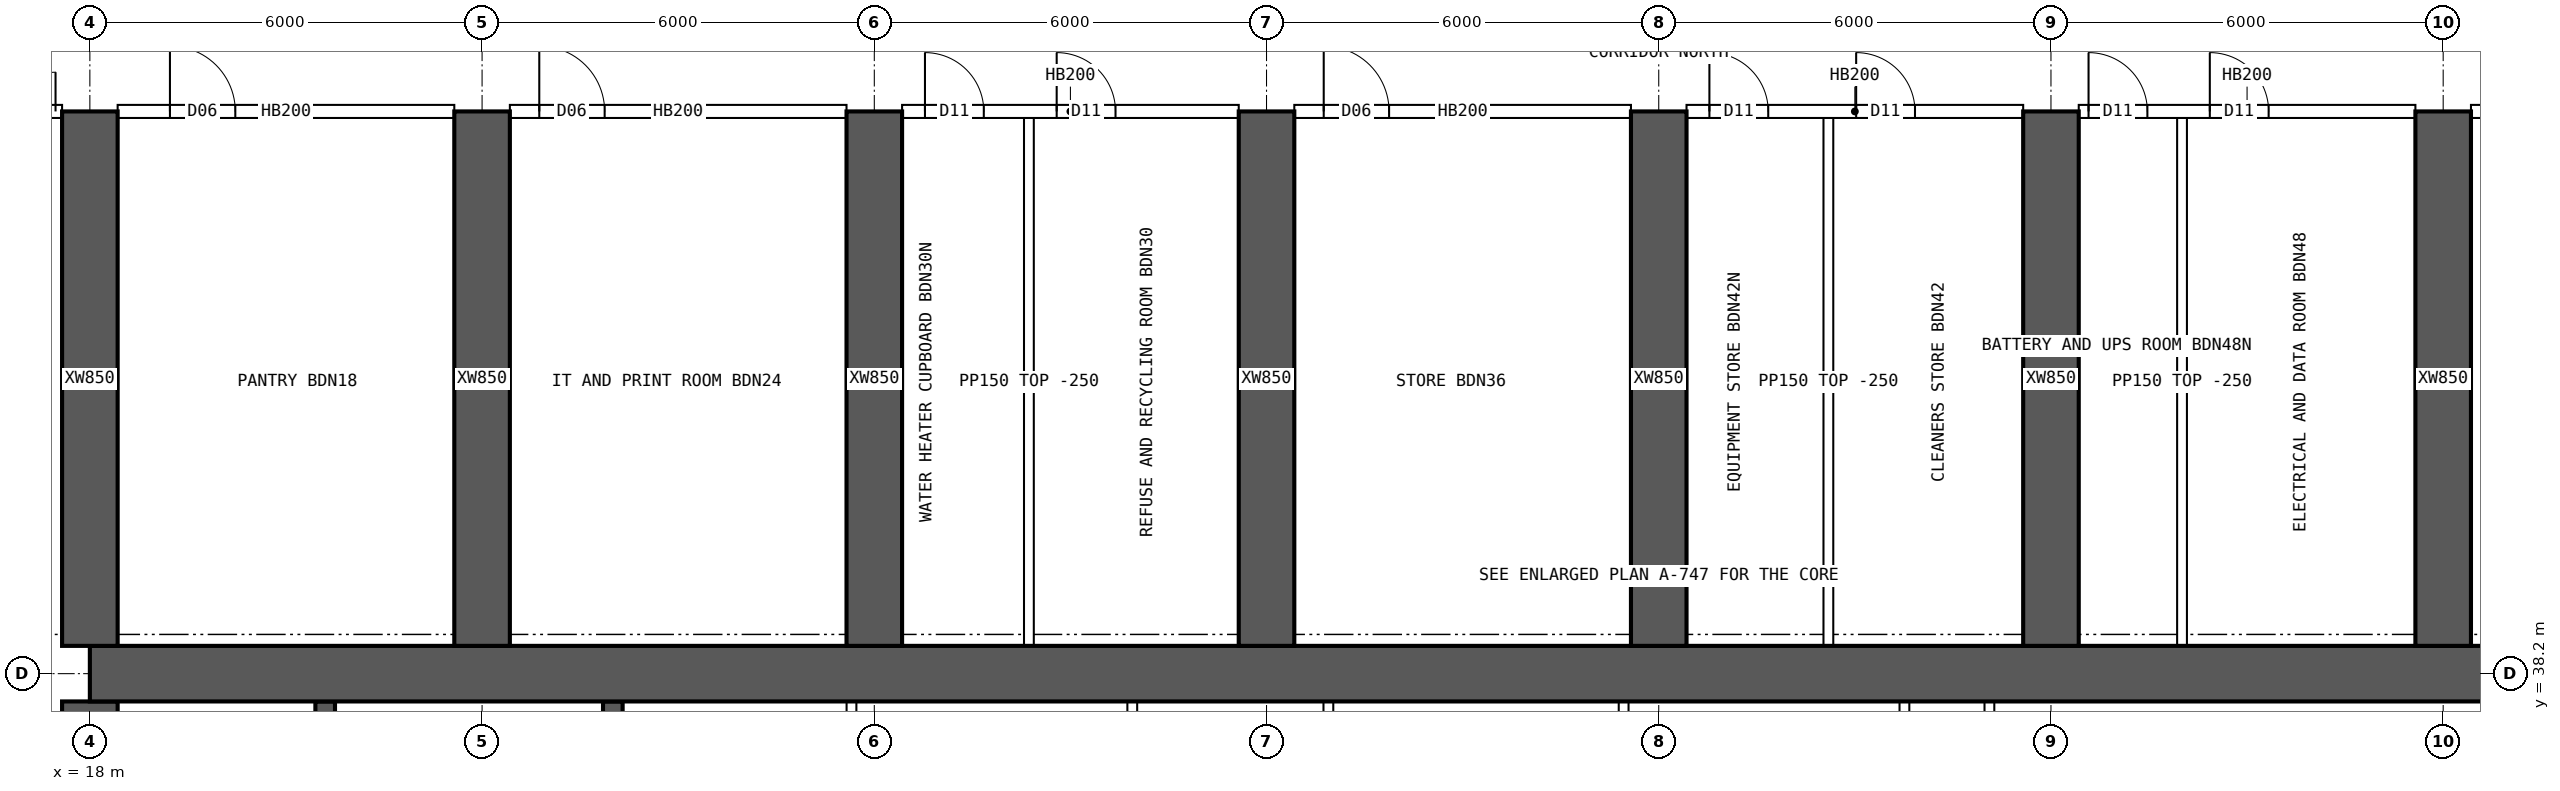
"""IFC4 building model, lengths in metres.
Left out: names, types, materials, properties, quantities, classifications, styles, units other than length and angle.
Written with IfcOpenShell. Run it as: python <this file> out.ifc"""

import sys

from ifc_helpers import new_model, si_unit, direction, frame, frame_2d, origin, place, context, subcontext, project, spatial, rectangle, extrude, element, fill, save


model = new_model("IFC4")
c1 = context("Model", 3, precision=1e-05, world=origin(), true_north=direction((0.0, 1.0)))
c2 = subcontext(c1, "Body", "Model", "MODEL_VIEW")
j1 = project(units=[si_unit("LENGTHUNIT", "METRE"), si_unit("PLANEANGLEUNIT", "RADIAN")], contexts=[c1])
p1 = place(None, origin())
s1 = spatial("IfcSite", under=j1, at=p1, CompositionType="ELEMENT")
p2 = place(p1, origin())
s2 = spatial("IfcBuilding", under=s1, at=p2, CompositionType="ELEMENT")
p3 = place(p2, frame((0.0, 0.0, 178.6)))
s3 = spatial("IfcBuildingStorey", under=s2, at=p3, CompositionType="ELEMENT", Elevation=178.6)
p4 = place(p3, frame((18.0, 38.2, 0.0), z_axis=(0.0, 0.0, 1.0), x_axis=(1.0, 0.0, 0.0)))
e1 = element("IfcWall", 1, at=p4, inside=s3, PredefinedType="SHEAR", context=c2, shape_type="SweptSolid", body=[
    extrude(rectangle(XDim=48.0, YDim=0.85, at=frame_2d((24.0, 0.0))), origin(), (0.0, 0.0, 1.0), 3.75),
])
p5 = place(p3, frame((18.0, 26.225, 0.0), z_axis=(0.0, 0.0, 1.0), x_axis=(0.0, 1.0, 0.0)))
e2 = element("IfcWall", 2, at=p5, inside=s3, PredefinedType="SHEAR", context=c2, shape_type="SweptSolid", body=[
    extrude(rectangle(XDim=11.55, YDim=0.85, at=frame_2d((5.775, 0.0))), origin(), (0.0, 0.0, 1.0), 3.75),
])
p6 = place(p5, frame((5.075, 0.0, 0.0)))
e3 = element("IfcOpeningElement", 3, at=p6, cuts=e2, PredefinedType="OPENING", context=c2, shape_type="SweptSolid", body=[
    extrude(rectangle(XDim=1.2, YDim=2.1, at=frame_2d((0.6, 1.05))), frame((0.0, 0.435, 0.0), z_axis=(0.0, -1.0, 0.0), x_axis=(1.0, 0.0, 0.0)), (0.0, 0.0, 1.0), 0.87),
])
for number, where, z_axis, x_axis in (
    (4, (21.6, 34.75, 0.0), (0.0, 0.0, 1.0), (0.0, 1.0, 0.0)),
    (5, (26.0, 34.75, 0.0), (0.0, 0.0, 1.0), (0.0, 1.0, 0.0)),
):
    element("IfcWall", number, at=place(p3, frame(where, z_axis=z_axis, x_axis=x_axis)), inside=s3, PredefinedType="SHEAR", context=c2, shape_type="SweptSolid", body=[
        extrude(rectangle(XDim=3.025, YDim=0.3, at=frame_2d((1.512, 0.0))), origin(), (0.0, 0.0, 1.0), 3.75),
    ])
for number, where, z_axis, x_axis in (
    (6, (18.0, 38.625, 0.0), (0.0, 0.0, 1.0), (0.0, 1.0, 0.0)),
    (7, (24.0, 38.625, 0.0), (0.0, 0.0, 1.0), (0.0, 1.0, 0.0)),
    (8, (30.0, 38.625, 0.0), (0.0, 0.0, 1.0), (0.0, 1.0, 0.0)),
    (9, (36.0, 38.625, 0.0), (0.0, 0.0, 1.0), (0.0, 1.0, 0.0)),
    (10, (42.0, 38.625, 0.0), (0.0, 0.0, 1.0), (0.0, 1.0, 0.0)),
    (11, (48.0, 38.625, 0.0), (0.0, 0.0, 1.0), (0.0, 1.0, 0.0)),
    (12, (54.0, 38.625, 0.0), (0.0, 0.0, 1.0), (0.0, 1.0, 0.0)),
):
    element("IfcWall", number, at=place(p3, frame(where, z_axis=z_axis, x_axis=x_axis)), inside=s3, PredefinedType="SHEAR", context=c2, shape_type="SweptSolid", body=[
        extrude(rectangle(XDim=8.175, YDim=0.85, at=frame_2d((4.087, 0.0))), origin(), (0.0, 0.0, 1.0), 3.75),
    ])
for number, where, z_axis, x_axis in (
    (13, (29.651, 34.75, 0.0), (0.0, 0.0, 1.0), (0.0, 1.0, 0.0)),
    (14, (33.946, 34.75, 0.0), (0.0, 0.0, 1.0), (0.0, 1.0, 0.0)),
    (15, (36.946, 34.75, 0.0), (0.0, 0.0, 1.0), (0.0, 1.0, 0.0)),
    (16, (41.463, 34.75, 0.0), (0.0, 0.0, 1.0), (0.0, 1.0, 0.0)),
    (17, (45.758, 34.75, 0.0), (0.0, 0.0, 1.0), (0.0, 1.0, 0.0)),
    (18, (47.058, 34.75, 0.0), (0.0, 0.0, 1.0), (0.0, 1.0, 0.0)),
):
    element("IfcWall", number, at=place(p3, frame(where, z_axis=z_axis, x_axis=x_axis)), inside=s3, PredefinedType="SOLIDWALL", context=c2, shape_type="SweptSolid", body=[
        extrude(rectangle(XDim=3.025, YDim=0.15, at=frame_2d((1.512, 0.0))), origin(), (0.0, 0.0, 1.0), 3.5),
    ])
p7 = place(p3, frame((15.6, 46.8, 0.0), z_axis=(0.0, 0.0, 1.0), x_axis=(1.0, 0.0, 0.0)))
e19 = element("IfcWall", 19, at=p7, inside=s3, PredefinedType="SOLIDWALL", context=c2, shape_type="SweptSolid", body=[
    extrude(rectangle(XDim=1.975, YDim=0.2, at=frame_2d((0.987, 0.0))), origin(), (0.0, 0.0, 1.0), 3.5),
])
p8 = place(p7, frame((0.675, 0.0, 0.0)))
e20 = element("IfcOpeningElement", 20, at=p8, cuts=e19, PredefinedType="OPENING", context=c2, shape_type="SweptSolid", body=[
    extrude(rectangle(XDim=1.2, YDim=2.1, at=frame_2d((0.6, 1.05))), frame((0.0, 0.11, 0.0), z_axis=(0.0, -1.0, 0.0), x_axis=(1.0, 0.0, 0.0)), (0.0, 0.0, 1.0), 0.22),
])
p9 = place(p3, frame((18.425, 46.8, 0.0), z_axis=(0.0, 0.0, 1.0), x_axis=(1.0, 0.0, 0.0)))
e21 = element("IfcWall", 21, at=p9, inside=s3, PredefinedType="SOLIDWALL", context=c2, shape_type="SweptSolid", body=[
    extrude(rectangle(XDim=5.15, YDim=0.2, at=frame_2d((2.575, 0.0))), origin(), (0.0, 0.0, 1.0), 3.5),
])
p10 = place(p9, frame((0.8, 0.0, 0.0)))
e22 = element("IfcOpeningElement", 22, at=p10, cuts=e21, PredefinedType="OPENING", context=c2, shape_type="SweptSolid", body=[
    extrude(rectangle(XDim=1.0, YDim=2.1, at=frame_2d((0.5, 1.05))), frame((0.0, 0.11, 0.0), z_axis=(0.0, -1.0, 0.0), x_axis=(1.0, 0.0, 0.0)), (0.0, 0.0, 1.0), 0.22),
])
p11 = place(p3, frame((24.425, 46.8, 0.0), z_axis=(0.0, 0.0, 1.0), x_axis=(1.0, 0.0, 0.0)))
e23 = element("IfcWall", 23, at=p11, inside=s3, PredefinedType="SOLIDWALL", context=c2, shape_type="SweptSolid", body=[
    extrude(rectangle(XDim=5.15, YDim=0.2, at=frame_2d((2.575, 0.0))), origin(), (0.0, 0.0, 1.0), 3.5),
])
p12 = place(p11, frame((0.45, 0.0, 0.0)))
e24 = element("IfcOpeningElement", 24, at=p12, cuts=e23, PredefinedType="OPENING", context=c2, shape_type="SweptSolid", body=[
    extrude(rectangle(XDim=1.0, YDim=2.1, at=frame_2d((0.5, 1.05))), frame((0.0, 0.11, 0.0), z_axis=(0.0, -1.0, 0.0), x_axis=(1.0, 0.0, 0.0)), (0.0, 0.0, 1.0), 0.22),
])
p13 = place(p3, frame((30.425, 46.8, 0.0), z_axis=(0.0, 0.0, 1.0), x_axis=(1.0, 0.0, 0.0)))
e25 = element("IfcWall", 25, at=p13, inside=s3, PredefinedType="SOLIDWALL", context=c2, shape_type="SweptSolid", body=[
    extrude(rectangle(XDim=5.15, YDim=0.2, at=frame_2d((2.575, 0.0))), origin(), (0.0, 0.0, 1.0), 3.5),
])
p14 = place(p13, frame((0.35, 0.0, 0.0)))
e26 = element("IfcOpeningElement", 26, at=p14, cuts=e25, PredefinedType="OPENING", context=c2, shape_type="SweptSolid", body=[
    extrude(rectangle(XDim=0.9, YDim=2.1, at=frame_2d((0.45, 1.05))), frame((0.0, 0.11, 0.0), z_axis=(0.0, -1.0, 0.0), x_axis=(1.0, 0.0, 0.0)), (0.0, 0.0, 1.0), 0.22),
])
p15 = place(p13, frame((2.365, 0.0, 0.0)))
e27 = element("IfcOpeningElement", 27, at=p15, cuts=e25, PredefinedType="OPENING", context=c2, shape_type="SweptSolid", body=[
    extrude(rectangle(XDim=0.9, YDim=2.1, at=frame_2d((0.45, 1.05))), frame((0.0, 0.11, 0.0), z_axis=(0.0, -1.0, 0.0), x_axis=(1.0, 0.0, 0.0)), (0.0, 0.0, 1.0), 0.22),
])
p16 = place(p3, frame((36.425, 46.8, 0.0), z_axis=(0.0, 0.0, 1.0), x_axis=(1.0, 0.0, 0.0)))
e28 = element("IfcWall", 28, at=p16, inside=s3, PredefinedType="SOLIDWALL", context=c2, shape_type="SweptSolid", body=[
    extrude(rectangle(XDim=5.15, YDim=0.2, at=frame_2d((2.575, 0.0))), origin(), (0.0, 0.0, 1.0), 3.5),
])
p17 = place(p16, frame((0.45, 0.0, 0.0)))
e29 = element("IfcOpeningElement", 29, at=p17, cuts=e28, PredefinedType="OPENING", context=c2, shape_type="SweptSolid", body=[
    extrude(rectangle(XDim=1.0, YDim=2.1, at=frame_2d((0.5, 1.05))), frame((0.0, 0.11, 0.0), z_axis=(0.0, -1.0, 0.0), x_axis=(1.0, 0.0, 0.0)), (0.0, 0.0, 1.0), 0.22),
])
p18 = place(p3, frame((42.425, 46.8, 0.0), z_axis=(0.0, 0.0, 1.0), x_axis=(1.0, 0.0, 0.0)))
e30 = element("IfcWall", 30, at=p18, inside=s3, PredefinedType="SOLIDWALL", context=c2, shape_type="SweptSolid", body=[
    extrude(rectangle(XDim=5.15, YDim=0.2, at=frame_2d((2.575, 0.0))), origin(), (0.0, 0.0, 1.0), 3.5),
])
p19 = place(p18, frame((0.35, 0.0, 0.0)))
e31 = element("IfcOpeningElement", 31, at=p19, cuts=e30, PredefinedType="OPENING", context=c2, shape_type="SweptSolid", body=[
    extrude(rectangle(XDim=0.9, YDim=2.1, at=frame_2d((0.45, 1.05))), frame((0.0, 0.11, 0.0), z_axis=(0.0, -1.0, 0.0), x_axis=(1.0, 0.0, 0.0)), (0.0, 0.0, 1.0), 0.22),
])
p20 = place(p18, frame((2.595, 0.0, 0.0)))
e32 = element("IfcOpeningElement", 32, at=p20, cuts=e30, PredefinedType="OPENING", context=c2, shape_type="SweptSolid", body=[
    extrude(rectangle(XDim=0.9, YDim=2.1, at=frame_2d((0.45, 1.05))), frame((0.0, 0.11, 0.0), z_axis=(0.0, -1.0, 0.0), x_axis=(1.0, 0.0, 0.0)), (0.0, 0.0, 1.0), 0.22),
])
p21 = place(p3, frame((48.425, 46.8, 0.0), z_axis=(0.0, 0.0, 1.0), x_axis=(1.0, 0.0, 0.0)))
e33 = element("IfcWall", 33, at=p21, inside=s3, PredefinedType="SOLIDWALL", context=c2, shape_type="SweptSolid", body=[
    extrude(rectangle(XDim=5.15, YDim=0.2, at=frame_2d((2.575, 0.0))), origin(), (0.0, 0.0, 1.0), 3.5),
])
p22 = place(p21, frame((0.15, 0.0, 0.0)))
e34 = element("IfcOpeningElement", 34, at=p22, cuts=e33, PredefinedType="OPENING", context=c2, shape_type="SweptSolid", body=[
    extrude(rectangle(XDim=0.9, YDim=2.1, at=frame_2d((0.45, 1.05))), frame((0.0, 0.11, 0.0), z_axis=(0.0, -1.0, 0.0), x_axis=(1.0, 0.0, 0.0)), (0.0, 0.0, 1.0), 0.22),
])
p23 = place(p21, frame((2.005, 0.0, 0.0)))
e35 = element("IfcOpeningElement", 35, at=p23, cuts=e33, PredefinedType="OPENING", context=c2, shape_type="SweptSolid", body=[
    extrude(rectangle(XDim=0.9, YDim=2.1, at=frame_2d((0.45, 1.05))), frame((0.0, 0.11, 0.0), z_axis=(0.0, -1.0, 0.0), x_axis=(1.0, 0.0, 0.0)), (0.0, 0.0, 1.0), 0.22),
])
p24 = place(p3, frame((54.425, 46.8, 0.0), z_axis=(0.0, 0.0, 1.0), x_axis=(1.0, 0.0, 0.0)))
e36 = element("IfcWall", 36, at=p24, inside=s3, PredefinedType="SOLIDWALL", context=c2, shape_type="SweptSolid", body=[
    extrude(rectangle(XDim=5.15, YDim=0.2, at=frame_2d((2.575, 0.0))), origin(), (0.0, 0.0, 1.0), 3.5),
])
p25 = place(p24, frame((0.35, 0.0, 0.0)))
e37 = element("IfcOpeningElement", 37, at=p25, cuts=e36, PredefinedType="OPENING", context=c2, shape_type="SweptSolid", body=[
    extrude(rectangle(XDim=0.9, YDim=2.1, at=frame_2d((0.45, 1.05))), frame((0.0, 0.11, 0.0), z_axis=(0.0, -1.0, 0.0), x_axis=(1.0, 0.0, 0.0)), (0.0, 0.0, 1.0), 0.22),
])
p26 = place(p24, frame((4.005, 0.0, 0.0)))
e38 = element("IfcOpeningElement", 38, at=p26, cuts=e36, PredefinedType="OPENING", context=c2, shape_type="SweptSolid", body=[
    extrude(rectangle(XDim=0.9, YDim=2.1, at=frame_2d((0.45, 1.05))), frame((0.0, 0.11, 0.0), z_axis=(0.0, -1.0, 0.0), x_axis=(1.0, 0.0, 0.0)), (0.0, 0.0, 1.0), 0.22),
])
for number, where, z_axis, x_axis in (
    (39, (32.365, 38.625, 0.0), (0.0, 0.0, 1.0), (0.0, 1.0, 0.0)),
    (40, (44.595, 38.625, 0.0), (0.0, 0.0, 1.0), (0.0, 1.0, 0.0)),
    (41, (50.005, 38.625, 0.0), (0.0, 0.0, 1.0), (0.0, 1.0, 0.0)),
):
    element("IfcWall", number, at=place(p3, frame(where, z_axis=z_axis, x_axis=x_axis)), inside=s3, PredefinedType="PARTITIONING", context=c2, shape_type="SweptSolid", body=[
        extrude(rectangle(XDim=8.075, YDim=0.15, at=frame_2d((4.038, 0.0))), origin(), (0.0, 0.0, 1.0), 3.5),
    ])
p27 = place(p8, origin())
e42 = element("IfcDoor", 42, at=p27, inside=s3, OperationType="DOUBLE_DOOR_SINGLE_SWING", PredefinedType="DOOR", context=c2, shape_type="SweptSolid", body=[
    extrude(rectangle(XDim=1.2, YDim=2.1, at=frame_2d((0.6, 1.05))), frame((0.0, 0.025, 0.0), z_axis=(0.0, -1.0, 0.0), x_axis=(1.0, 0.0, 0.0)), (0.0, 0.0, 1.0), 0.05),
])
fill(e20, e42)
p28 = place(p10, origin())
e43 = element("IfcDoor", 43, at=p28, inside=s3, OperationType="SINGLE_SWING_LEFT", PredefinedType="DOOR", context=c2, shape_type="SweptSolid", body=[
    extrude(rectangle(XDim=1.0, YDim=2.1, at=frame_2d((0.5, 1.05))), frame((0.0, 0.025, 0.0), z_axis=(0.0, -1.0, 0.0), x_axis=(1.0, 0.0, 0.0)), (0.0, 0.0, 1.0), 0.05),
])
fill(e22, e43)
p29 = place(p12, origin())
e44 = element("IfcDoor", 44, at=p29, inside=s3, OperationType="SINGLE_SWING_LEFT", PredefinedType="DOOR", context=c2, shape_type="SweptSolid", body=[
    extrude(rectangle(XDim=1.0, YDim=2.1, at=frame_2d((0.5, 1.05))), frame((0.0, 0.025, 0.0), z_axis=(0.0, -1.0, 0.0), x_axis=(1.0, 0.0, 0.0)), (0.0, 0.0, 1.0), 0.05),
])
fill(e24, e44)
p30 = place(p14, origin())
e45 = element("IfcDoor", 45, at=p30, inside=s3, OperationType="SINGLE_SWING_LEFT", PredefinedType="DOOR", context=c2, shape_type="SweptSolid", body=[
    extrude(rectangle(XDim=0.9, YDim=2.1, at=frame_2d((0.45, 1.05))), frame((0.0, 0.025, 0.0), z_axis=(0.0, -1.0, 0.0), x_axis=(1.0, 0.0, 0.0)), (0.0, 0.0, 1.0), 0.05),
])
fill(e26, e45)
p31 = place(p15, origin())
e46 = element("IfcDoor", 46, at=p31, inside=s3, OperationType="SINGLE_SWING_LEFT", PredefinedType="DOOR", context=c2, shape_type="SweptSolid", body=[
    extrude(rectangle(XDim=0.9, YDim=2.1, at=frame_2d((0.45, 1.05))), frame((0.0, 0.025, 0.0), z_axis=(0.0, -1.0, 0.0), x_axis=(1.0, 0.0, 0.0)), (0.0, 0.0, 1.0), 0.05),
])
fill(e27, e46)
p32 = place(p17, origin())
e47 = element("IfcDoor", 47, at=p32, inside=s3, OperationType="SINGLE_SWING_LEFT", PredefinedType="DOOR", context=c2, shape_type="SweptSolid", body=[
    extrude(rectangle(XDim=1.0, YDim=2.1, at=frame_2d((0.5, 1.05))), frame((0.0, 0.025, 0.0), z_axis=(0.0, -1.0, 0.0), x_axis=(1.0, 0.0, 0.0)), (0.0, 0.0, 1.0), 0.05),
])
fill(e29, e47)
p33 = place(p19, origin())
e48 = element("IfcDoor", 48, at=p33, inside=s3, OperationType="SINGLE_SWING_LEFT", PredefinedType="DOOR", context=c2, shape_type="SweptSolid", body=[
    extrude(rectangle(XDim=0.9, YDim=2.1, at=frame_2d((0.45, 1.05))), frame((0.0, 0.025, 0.0), z_axis=(0.0, -1.0, 0.0), x_axis=(1.0, 0.0, 0.0)), (0.0, 0.0, 1.0), 0.05),
])
fill(e31, e48)
p34 = place(p20, origin())
e49 = element("IfcDoor", 49, at=p34, inside=s3, OperationType="SINGLE_SWING_LEFT", PredefinedType="DOOR", context=c2, shape_type="SweptSolid", body=[
    extrude(rectangle(XDim=0.9, YDim=2.1, at=frame_2d((0.45, 1.05))), frame((0.0, 0.025, 0.0), z_axis=(0.0, -1.0, 0.0), x_axis=(1.0, 0.0, 0.0)), (0.0, 0.0, 1.0), 0.05),
])
fill(e32, e49)
p35 = place(p22, origin())
e50 = element("IfcDoor", 50, at=p35, inside=s3, OperationType="SINGLE_SWING_LEFT", PredefinedType="DOOR", context=c2, shape_type="SweptSolid", body=[
    extrude(rectangle(XDim=0.9, YDim=2.1, at=frame_2d((0.45, 1.05))), frame((0.0, 0.025, 0.0), z_axis=(0.0, -1.0, 0.0), x_axis=(1.0, 0.0, 0.0)), (0.0, 0.0, 1.0), 0.05),
])
fill(e34, e50)
p36 = place(p23, origin())
e51 = element("IfcDoor", 51, at=p36, inside=s3, OperationType="SINGLE_SWING_LEFT", PredefinedType="DOOR", context=c2, shape_type="SweptSolid", body=[
    extrude(rectangle(XDim=0.9, YDim=2.1, at=frame_2d((0.45, 1.05))), frame((0.0, 0.025, 0.0), z_axis=(0.0, -1.0, 0.0), x_axis=(1.0, 0.0, 0.0)), (0.0, 0.0, 1.0), 0.05),
])
fill(e35, e51)
save(model, sys.argv[1])
